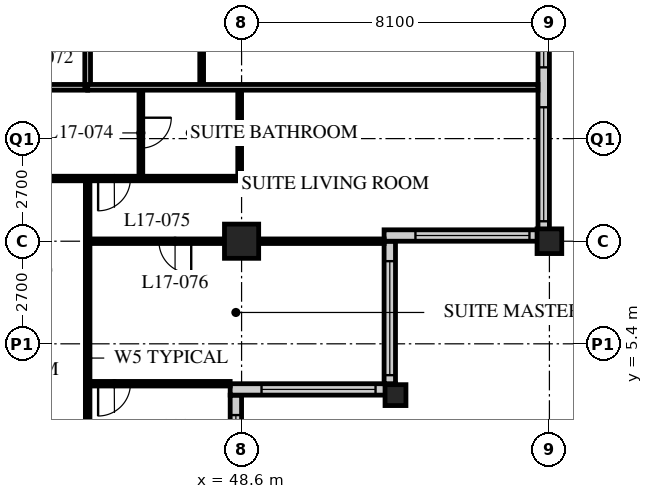
"""IFC4 building model, lengths in metres.
Left out: names, types, materials, properties, quantities, classifications, styles, units other than length and angle.
Written with IfcOpenShell. Run it as: python <this file> out.ifc"""

import sys

from ifc_helpers import new_model, si_unit, direction, frame, frame_2d, origin, origin_2d, place, context, subcontext, project, spatial, rectangle, hollow_rectangle, extrude, element, fill, save


model = new_model("IFC4")
c1 = context("Model", 3, precision=1e-05, world=origin(), true_north=direction((0.0, 1.0)))
c2 = subcontext(c1, "Body", "Model", "MODEL_VIEW")
j1 = project(units=[si_unit("LENGTHUNIT", "METRE"), si_unit("PLANEANGLEUNIT", "RADIAN")], contexts=[c1])
p1 = place(None, origin())
s1 = spatial("IfcSite", under=j1, at=p1, CompositionType="ELEMENT")
p2 = place(p1, origin())
s2 = spatial("IfcBuilding", under=s1, at=p2, CompositionType="ELEMENT")
p3 = place(p2, frame((0.0, 0.0, 70.4)))
s3 = spatial("IfcBuildingStorey", under=s2, at=p3, CompositionType="ELEMENT", Elevation=70.4)
p4 = place(p3, frame((48.6, 8.1, 0.0), z_axis=(0.0, 0.0, 1.0), x_axis=(1.0, 0.0, 0.0)))
e1 = element("IfcColumn", 1, at=p4, inside=s3, PredefinedType="COLUMN", context=c2, shape_type="SweptSolid", body=[
    extrude(hollow_rectangle(XDim=0.9, YDim=0.9, WallThickness=0.09, at=origin_2d()), origin(), (0.0, 0.0, 1.0), 3.4),
])
p5 = place(p3, frame((52.65, 4.05, 0.0), z_axis=(0.0, 0.0, 1.0), x_axis=(1.0, 0.0, 0.0)))
e2 = element("IfcColumn", 2, at=p5, inside=s3, PredefinedType="COLUMN", context=c2, shape_type="SweptSolid", body=[
    extrude(hollow_rectangle(XDim=0.55, YDim=0.55, WallThickness=0.05, at=origin_2d()), origin(), (0.0, 0.0, 1.0), 3.4),
])
p6 = place(p3, frame((56.7, 8.1, 0.0), z_axis=(0.0, 0.0, 1.0), x_axis=(1.0, 0.0, 0.0)))
e3 = element("IfcColumn", 3, at=p6, inside=s3, PredefinedType="COLUMN", context=c2, shape_type="SweptSolid", body=[
    extrude(hollow_rectangle(XDim=0.65, YDim=0.65, WallThickness=0.05, at=origin_2d()), origin(), (0.0, 0.0, 1.0), 3.4),
])
p7 = place(p3, frame((48.45, 0.3, 0.0), z_axis=(0.0, 0.0, 1.0), x_axis=(0.0, 1.0, 0.0)))
e4 = element("IfcWall", 4, at=p7, inside=s3, PredefinedType="SOLIDWALL", context=c2, shape_type="SweptSolid", body=[
    extrude(rectangle(XDim=3.75, YDim=0.3, at=frame_2d((1.875, 0.0))), origin(), (0.0, 0.0, 1.0), 3.19),
])
p8 = place(p7, frame((0.225, 0.0, 0.9)))
e5 = element("IfcOpeningElement", 5, at=p8, cuts=e4, PredefinedType="OPENING", context=c2, shape_type="SweptSolid", body=[
    extrude(rectangle(XDim=3.0, YDim=1.5, at=frame_2d((1.5, 0.75))), frame((0.0, 0.16, 0.0), z_axis=(0.0, -1.0, 0.0), x_axis=(1.0, 0.0, 0.0)), (0.0, 0.0, 1.0), 0.32),
])
p9 = place(p3, frame((48.3, 4.2, 0.0), z_axis=(0.0, 0.0, 1.0), x_axis=(1.0, 0.0, 0.0)))
e6 = element("IfcWall", 6, at=p9, inside=s3, PredefinedType="SOLIDWALL", context=c2, shape_type="SweptSolid", body=[
    extrude(rectangle(XDim=4.35, YDim=0.3, at=frame_2d((2.175, 0.0))), origin(), (0.0, 0.0, 1.0), 3.19),
])
p10 = place(p9, frame((0.825, 0.0, 0.9)))
e7 = element("IfcOpeningElement", 7, at=p10, cuts=e6, PredefinedType="OPENING", context=c2, shape_type="SweptSolid", body=[
    extrude(rectangle(XDim=3.0, YDim=1.5, at=frame_2d((1.5, 0.75))), frame((0.0, 0.16, 0.0), z_axis=(0.0, -1.0, 0.0), x_axis=(1.0, 0.0, 0.0)), (0.0, 0.0, 1.0), 0.32),
])
p11 = place(p3, frame((52.5, 4.35, 0.0), z_axis=(0.0, 0.0, 1.0), x_axis=(0.0, 1.0, 0.0)))
e8 = element("IfcWall", 8, at=p11, inside=s3, PredefinedType="SOLIDWALL", context=c2, shape_type="SweptSolid", body=[
    extrude(rectangle(XDim=3.75, YDim=0.3, at=frame_2d((1.875, 0.0))), origin(), (0.0, 0.0, 1.0), 3.19),
])
p12 = place(p11, frame((0.225, 0.0, 0.9)))
e9 = element("IfcOpeningElement", 9, at=p12, cuts=e8, PredefinedType="OPENING", context=c2, shape_type="SweptSolid", body=[
    extrude(rectangle(XDim=3.0, YDim=1.5, at=frame_2d((1.5, 0.75))), frame((0.0, 0.16, 0.0), z_axis=(0.0, -1.0, 0.0), x_axis=(1.0, 0.0, 0.0)), (0.0, 0.0, 1.0), 0.32),
])
p13 = place(p3, frame((52.35, 8.25, 0.0), z_axis=(0.0, 0.0, 1.0), x_axis=(1.0, 0.0, 0.0)))
e10 = element("IfcWall", 10, at=p13, inside=s3, PredefinedType="SOLIDWALL", context=c2, shape_type="SweptSolid", body=[
    extrude(rectangle(XDim=4.35, YDim=0.3, at=frame_2d((2.175, 0.0))), origin(), (0.0, 0.0, 1.0), 3.19),
])
p14 = place(p13, frame((0.825, 0.0, 0.9)))
e11 = element("IfcOpeningElement", 11, at=p14, cuts=e10, PredefinedType="OPENING", context=c2, shape_type="SweptSolid", body=[
    extrude(rectangle(XDim=3.0, YDim=1.5, at=frame_2d((1.5, 0.75))), frame((0.0, 0.16, 0.0), z_axis=(0.0, -1.0, 0.0), x_axis=(1.0, 0.0, 0.0)), (0.0, 0.0, 1.0), 0.32),
])
p15 = place(p3, frame((56.55, 8.4, 0.0), z_axis=(0.0, 0.0, 1.0), x_axis=(0.0, 1.0, 0.0)))
e12 = element("IfcWall", 12, at=p15, inside=s3, PredefinedType="SOLIDWALL", context=c2, shape_type="SweptSolid", body=[
    extrude(rectangle(XDim=32.1, YDim=0.3, at=frame_2d((16.05, 0.0))), origin(), (0.0, 0.0, 1.0), 3.19),
])
p16 = place(p15, frame((0.225, 0.0, 0.9)))
e13 = element("IfcOpeningElement", 13, at=p16, cuts=e12, PredefinedType="OPENING", context=c2, shape_type="SweptSolid", body=[
    extrude(rectangle(XDim=3.0, YDim=2.0, at=frame_2d((1.5, 1.0))), frame((0.0, 0.16, 0.0), z_axis=(0.0, -1.0, 0.0), x_axis=(1.0, 0.0, 0.0)), (0.0, 0.0, 1.0), 0.32),
])
p17 = place(p15, frame((4.275, 0.0, 0.9)))
e14 = element("IfcOpeningElement", 14, at=p17, cuts=e12, PredefinedType="OPENING", context=c2, shape_type="SweptSolid", body=[
    extrude(rectangle(XDim=3.0, YDim=2.0, at=frame_2d((1.5, 1.0))), frame((0.0, 0.16, 0.0), z_axis=(0.0, -1.0, 0.0), x_axis=(1.0, 0.0, 0.0)), (0.0, 0.0, 1.0), 0.32),
])
p18 = place(p15, frame((8.325, 0.0, 0.9)))
e15 = element("IfcOpeningElement", 15, at=p18, cuts=e12, PredefinedType="OPENING", context=c2, shape_type="SweptSolid", body=[
    extrude(rectangle(XDim=3.0, YDim=2.0, at=frame_2d((1.5, 1.0))), frame((0.0, 0.16, 0.0), z_axis=(0.0, -1.0, 0.0), x_axis=(1.0, 0.0, 0.0)), (0.0, 0.0, 1.0), 0.32),
])
p19 = place(p15, frame((12.375, 0.0, 0.9)))
e16 = element("IfcOpeningElement", 16, at=p19, cuts=e12, PredefinedType="OPENING", context=c2, shape_type="SweptSolid", body=[
    extrude(rectangle(XDim=3.0, YDim=2.0, at=frame_2d((1.5, 1.0))), frame((0.0, 0.16, 0.0), z_axis=(0.0, -1.0, 0.0), x_axis=(1.0, 0.0, 0.0)), (0.0, 0.0, 1.0), 0.32),
])
p20 = place(p15, frame((16.425, 0.0, 0.9)))
e17 = element("IfcOpeningElement", 17, at=p20, cuts=e12, PredefinedType="OPENING", context=c2, shape_type="SweptSolid", body=[
    extrude(rectangle(XDim=3.0, YDim=2.0, at=frame_2d((1.5, 1.0))), frame((0.0, 0.16, 0.0), z_axis=(0.0, -1.0, 0.0), x_axis=(1.0, 0.0, 0.0)), (0.0, 0.0, 1.0), 0.32),
])
p21 = place(p15, frame((20.475, 0.0, 0.9)))
e18 = element("IfcOpeningElement", 18, at=p21, cuts=e12, PredefinedType="OPENING", context=c2, shape_type="SweptSolid", body=[
    extrude(rectangle(XDim=3.0, YDim=2.0, at=frame_2d((1.5, 1.0))), frame((0.0, 0.16, 0.0), z_axis=(0.0, -1.0, 0.0), x_axis=(1.0, 0.0, 0.0)), (0.0, 0.0, 1.0), 0.32),
])
p22 = place(p15, frame((24.525, 0.0, 0.9)))
e19 = element("IfcOpeningElement", 19, at=p22, cuts=e12, PredefinedType="OPENING", context=c2, shape_type="SweptSolid", body=[
    extrude(rectangle(XDim=3.0, YDim=2.0, at=frame_2d((1.5, 1.0))), frame((0.0, 0.16, 0.0), z_axis=(0.0, -1.0, 0.0), x_axis=(1.0, 0.0, 0.0)), (0.0, 0.0, 1.0), 0.32),
])
p23 = place(p15, frame((28.575, 0.0, 0.9)))
e20 = element("IfcOpeningElement", 20, at=p23, cuts=e12, PredefinedType="OPENING", context=c2, shape_type="SweptSolid", body=[
    extrude(rectangle(XDim=3.0, YDim=2.0, at=frame_2d((1.5, 1.0))), frame((0.0, 0.16, 0.0), z_axis=(0.0, -1.0, 0.0), x_axis=(1.0, 0.0, 0.0)), (0.0, 0.0, 1.0), 0.32),
])
p24 = place(p3, frame((8.1, 12.15, 0.0), z_axis=(0.0, 0.0, 1.0), x_axis=(1.0, 0.0, 0.0)))
e21 = element("IfcWall", 21, at=p24, inside=s3, PredefinedType="PARTITIONING", context=c2, shape_type="SweptSolid", body=[
    extrude(rectangle(XDim=36.45, YDim=0.15, at=frame_2d((18.225, 0.0))), origin(), (0.0, 0.0, 1.0), 3.19),
])
p25 = place(p24, frame((4.35, 0.0, 0.0)))
e22 = element("IfcOpeningElement", 22, at=p25, cuts=e21, PredefinedType="OPENING", context=c2, shape_type="SweptSolid", body=[
    extrude(rectangle(XDim=1.0, YDim=2.1, at=frame_2d((0.5, 1.05))), frame((0.0, 0.085, 0.0), z_axis=(0.0, -1.0, 0.0), x_axis=(1.0, 0.0, 0.0)), (0.0, 0.0, 1.0), 0.17),
])
p26 = place(p24, frame((10.55, 0.0, 0.0)))
e23 = element("IfcOpeningElement", 23, at=p26, cuts=e21, PredefinedType="OPENING", context=c2, shape_type="SweptSolid", body=[
    extrude(rectangle(XDim=1.0, YDim=2.1, at=frame_2d((0.5, 1.05))), frame((0.0, 0.085, 0.0), z_axis=(0.0, -1.0, 0.0), x_axis=(1.0, 0.0, 0.0)), (0.0, 0.0, 1.0), 0.17),
])
p27 = place(p24, frame((14.6, 0.0, 0.0)))
e24 = element("IfcOpeningElement", 24, at=p27, cuts=e21, PredefinedType="OPENING", context=c2, shape_type="SweptSolid", body=[
    extrude(rectangle(XDim=1.0, YDim=2.1, at=frame_2d((0.5, 1.05))), frame((0.0, 0.085, 0.0), z_axis=(0.0, -1.0, 0.0), x_axis=(1.0, 0.0, 0.0)), (0.0, 0.0, 1.0), 0.17),
])
p28 = place(p24, frame((18.65, 0.0, 0.0)))
e25 = element("IfcOpeningElement", 25, at=p28, cuts=e21, PredefinedType="OPENING", context=c2, shape_type="SweptSolid", body=[
    extrude(rectangle(XDim=1.0, YDim=2.1, at=frame_2d((0.5, 1.05))), frame((0.0, 0.085, 0.0), z_axis=(0.0, -1.0, 0.0), x_axis=(1.0, 0.0, 0.0)), (0.0, 0.0, 1.0), 0.17),
])
p29 = place(p24, frame((22.7, 0.0, 0.0)))
e26 = element("IfcOpeningElement", 26, at=p29, cuts=e21, PredefinedType="OPENING", context=c2, shape_type="SweptSolid", body=[
    extrude(rectangle(XDim=1.0, YDim=2.1, at=frame_2d((0.5, 1.05))), frame((0.0, 0.085, 0.0), z_axis=(0.0, -1.0, 0.0), x_axis=(1.0, 0.0, 0.0)), (0.0, 0.0, 1.0), 0.17),
])
p30 = place(p24, frame((24.6, 0.0, 0.0)))
e27 = element("IfcOpeningElement", 27, at=p30, cuts=e21, PredefinedType="OPENING", context=c2, shape_type="SweptSolid", body=[
    extrude(rectangle(XDim=1.0, YDim=2.1, at=frame_2d((0.5, 1.05))), frame((0.0, 0.085, 0.0), z_axis=(0.0, -1.0, 0.0), x_axis=(1.0, 0.0, 0.0)), (0.0, 0.0, 1.0), 0.17),
])
p31 = place(p24, frame((30.8, 0.0, 0.0)))
e28 = element("IfcOpeningElement", 28, at=p31, cuts=e21, PredefinedType="OPENING", context=c2, shape_type="SweptSolid", body=[
    extrude(rectangle(XDim=1.0, YDim=2.1, at=frame_2d((0.5, 1.05))), frame((0.0, 0.085, 0.0), z_axis=(0.0, -1.0, 0.0), x_axis=(1.0, 0.0, 0.0)), (0.0, 0.0, 1.0), 0.17),
])
p32 = place(p24, frame((1.525, 0.0, 0.0)))
e29 = element("IfcOpeningElement", 29, at=p32, cuts=e21, PredefinedType="OPENING", context=c2, shape_type="SweptSolid", body=[
    extrude(rectangle(XDim=1.0, YDim=2.1, at=frame_2d((0.5, 1.05))), frame((0.0, 0.085, 0.0), z_axis=(0.0, -1.0, 0.0), x_axis=(1.0, 0.0, 0.0)), (0.0, 0.0, 1.0), 0.17),
])
p33 = place(p24, frame((33.925, 0.0, 0.0)))
e30 = element("IfcOpeningElement", 30, at=p33, cuts=e21, PredefinedType="OPENING", context=c2, shape_type="SweptSolid", body=[
    extrude(rectangle(XDim=1.0, YDim=2.1, at=frame_2d((0.5, 1.05))), frame((0.0, 0.085, 0.0), z_axis=(0.0, -1.0, 0.0), x_axis=(1.0, 0.0, 0.0)), (0.0, 0.0, 1.0), 0.17),
])
p34 = place(p3, frame((44.55, 12.15, 0.0), z_axis=(0.0, 0.0, 1.0), x_axis=(0.0, 1.0, 0.0)))
e31 = element("IfcWall", 31, at=p34, inside=s3, PredefinedType="PARTITIONING", context=c2, shape_type="SweptSolid", body=[
    extrude(rectangle(XDim=30.15, YDim=0.15, at=frame_2d((15.075, 0.0))), origin(), (0.0, 0.0, 1.0), 3.19),
])
p35 = place(p34, frame((2.45, 0.0, 0.0)))
e32 = element("IfcOpeningElement", 32, at=p35, cuts=e31, PredefinedType="OPENING", context=c2, shape_type="SweptSolid", body=[
    extrude(rectangle(XDim=1.0, YDim=2.1, at=frame_2d((0.5, 1.05))), frame((0.0, 0.085, 0.0), z_axis=(0.0, -1.0, 0.0), x_axis=(1.0, 0.0, 0.0)), (0.0, 0.0, 1.0), 0.17),
])
p36 = place(p34, frame((4.35, 0.0, 0.0)))
e33 = element("IfcOpeningElement", 33, at=p36, cuts=e31, PredefinedType="OPENING", context=c2, shape_type="SweptSolid", body=[
    extrude(rectangle(XDim=1.0, YDim=2.1, at=frame_2d((0.5, 1.05))), frame((0.0, 0.085, 0.0), z_axis=(0.0, -1.0, 0.0), x_axis=(1.0, 0.0, 0.0)), (0.0, 0.0, 1.0), 0.17),
])
p37 = place(p34, frame((8.4, 0.0, 0.0)))
e34 = element("IfcOpeningElement", 34, at=p37, cuts=e31, PredefinedType="OPENING", context=c2, shape_type="SweptSolid", body=[
    extrude(rectangle(XDim=1.0, YDim=2.1, at=frame_2d((0.5, 1.05))), frame((0.0, 0.085, 0.0), z_axis=(0.0, -1.0, 0.0), x_axis=(1.0, 0.0, 0.0)), (0.0, 0.0, 1.0), 0.17),
])
p38 = place(p34, frame((14.6, 0.0, 0.0)))
e35 = element("IfcOpeningElement", 35, at=p38, cuts=e31, PredefinedType="OPENING", context=c2, shape_type="SweptSolid", body=[
    extrude(rectangle(XDim=1.0, YDim=2.1, at=frame_2d((0.5, 1.05))), frame((0.0, 0.085, 0.0), z_axis=(0.0, -1.0, 0.0), x_axis=(1.0, 0.0, 0.0)), (0.0, 0.0, 1.0), 0.17),
])
p39 = place(p34, frame((21.65, 0.0, 0.0)))
e36 = element("IfcOpeningElement", 36, at=p39, cuts=e31, PredefinedType="OPENING", context=c2, shape_type="SweptSolid", body=[
    extrude(rectangle(XDim=1.0, YDim=2.1, at=frame_2d((0.5, 1.05))), frame((0.0, 0.085, 0.0), z_axis=(0.0, -1.0, 0.0), x_axis=(1.0, 0.0, 0.0)), (0.0, 0.0, 1.0), 0.17),
])
p40 = place(p34, frame((26.7, 0.0, 0.0)))
e37 = element("IfcOpeningElement", 37, at=p40, cuts=e31, PredefinedType="OPENING", context=c2, shape_type="SweptSolid", body=[
    extrude(rectangle(XDim=1.0, YDim=2.1, at=frame_2d((0.5, 1.05))), frame((0.0, 0.085, 0.0), z_axis=(0.0, -1.0, 0.0), x_axis=(1.0, 0.0, 0.0)), (0.0, 0.0, 1.0), 0.17),
])
p41 = place(p3, frame((47.55, 12.15, 0.0), z_axis=(0.0, 0.0, 1.0), x_axis=(0.0, 1.0, 0.0)))
e38 = element("IfcWall", 38, at=p41, inside=s3, PredefinedType="PARTITIONING", context=c2, shape_type="SweptSolid", body=[
    extrude(rectangle(XDim=2.3, YDim=0.1, at=frame_2d((1.15, 0.0))), origin(), (0.0, 0.0, 1.0), 3.19),
])
p42 = place(p3, frame((40.5, 9.75, 0.0), z_axis=(0.0, 0.0, 1.0), x_axis=(1.0, 0.0, 0.0)))
e39 = element("IfcWall", 39, at=p42, inside=s3, PredefinedType="PARTITIONING", context=c2, shape_type="SweptSolid", body=[
    extrude(rectangle(XDim=8.05, YDim=0.12, at=frame_2d((4.025, 0.0))), origin(), (0.0, 0.0, 1.0), 3.19),
])
p43 = place(p42, frame((0.475, 0.0, 0.0)))
e40 = element("IfcOpeningElement", 40, at=p43, cuts=e39, PredefinedType="OPENING", context=c2, shape_type="SweptSolid", body=[
    extrude(rectangle(XDim=0.85, YDim=2.1, at=frame_2d((0.425, 1.05))), frame((0.0, 0.07, 0.0), z_axis=(0.0, -1.0, 0.0), x_axis=(1.0, 0.0, 0.0)), (0.0, 0.0, 1.0), 0.14),
])
p44 = place(p42, frame((4.325, 0.0, 0.0)))
e41 = element("IfcOpeningElement", 41, at=p44, cuts=e39, PredefinedType="OPENING", context=c2, shape_type="SweptSolid", body=[
    extrude(rectangle(XDim=0.85, YDim=2.1, at=frame_2d((0.425, 1.05))), frame((0.0, 0.07, 0.0), z_axis=(0.0, -1.0, 0.0), x_axis=(1.0, 0.0, 0.0)), (0.0, 0.0, 1.0), 0.14),
])
p45 = place(p3, frame((45.95, 12.15, 0.0), z_axis=(0.0, 0.0, 1.0), x_axis=(0.0, -1.0, 0.0)))
e42 = element("IfcWall", 42, at=p45, inside=s3, PredefinedType="PARTITIONING", context=c2, shape_type="SweptSolid", body=[
    extrude(rectangle(XDim=2.4, YDim=0.1, at=frame_2d((1.2, 0.0))), origin(), (0.0, 0.0, 1.0), 3.19),
])
p46 = place(p45, frame((0.8, 0.0, 0.0)))
e43 = element("IfcOpeningElement", 43, at=p46, cuts=e42, PredefinedType="OPENING", context=c2, shape_type="SweptSolid", body=[
    extrude(rectangle(XDim=0.8, YDim=2.1, at=frame_2d((0.4, 1.05))), frame((0.0, 0.06, 0.0), z_axis=(0.0, -1.0, 0.0), x_axis=(1.0, 0.0, 0.0)), (0.0, 0.0, 1.0), 0.12),
])
p47 = place(p3, frame((48.55, 12.15, 0.0), z_axis=(0.0, 0.0, 1.0), x_axis=(0.0, -1.0, 0.0)))
e44 = element("IfcWall", 44, at=p47, inside=s3, PredefinedType="PARTITIONING", context=c2, shape_type="SweptSolid", body=[
    extrude(rectangle(XDim=2.4, YDim=0.1, at=frame_2d((1.2, 0.0))), origin(), (0.0, 0.0, 1.0), 2.578),
])
p48 = place(p3, frame((44.55, 9.75, 0.0), z_axis=(0.0, 0.0, 1.0), x_axis=(0.0, -1.0, 0.0)))
e45 = element("IfcWall", 45, at=p48, inside=s3, PredefinedType="PARTITIONING", context=c2, shape_type="SweptSolid", body=[
    extrude(rectangle(XDim=9.45, YDim=0.12, at=frame_2d((4.725, 0.0))), origin(), (0.0, 0.0, 1.0), 3.19),
])
p49 = place(p3, frame((44.55, 8.1, 0.0), z_axis=(0.0, 0.0, 1.0), x_axis=(1.0, 0.0, 0.0)))
e46 = element("IfcWall", 46, at=p49, inside=s3, PredefinedType="PARTITIONING", context=c2, shape_type="SweptSolid", body=[
    extrude(rectangle(XDim=7.8, YDim=0.12, at=frame_2d((3.9, 0.0))), origin(), (0.0, 0.0, 1.0), 2.578),
])
p50 = place(p49, frame((1.875, 0.0, 0.0)))
e47 = element("IfcOpeningElement", 47, at=p50, cuts=e46, PredefinedType="OPENING", context=c2, shape_type="SweptSolid", body=[
    extrude(rectangle(XDim=0.85, YDim=2.1, at=frame_2d((0.425, 1.05))), frame((0.0, 0.07, 0.0), z_axis=(0.0, -1.0, 0.0), x_axis=(1.0, 0.0, 0.0)), (0.0, 0.0, 1.0), 0.14),
])
p51 = place(p3, frame((44.55, 12.15, 0.0), z_axis=(0.0, 0.0, 1.0), x_axis=(1.0, 0.0, 0.0)))
e48 = element("IfcWall", 48, at=p51, inside=s3, PredefinedType="PARTITIONING", context=c2, shape_type="SweptSolid", body=[
    extrude(rectangle(XDim=11.85, YDim=0.15, at=frame_2d((5.925, 0.0))), origin(), (0.0, 0.0, 1.0), 3.19),
])
p52 = place(p3, frame((44.55, 4.35, 0.0), z_axis=(0.0, 0.0, 1.0), x_axis=(1.0, 0.0, 0.0)))
e49 = element("IfcWall", 49, at=p52, inside=s3, PredefinedType="PARTITIONING", context=c2, shape_type="SweptSolid", body=[
    extrude(rectangle(XDim=3.75, YDim=0.12, at=frame_2d((1.875, 0.0))), origin(), (0.0, 0.0, 1.0), 3.19),
])
p53 = place(p52, frame((0.275, 0.0, 0.0)))
e50 = element("IfcOpeningElement", 50, at=p53, cuts=e49, PredefinedType="OPENING", context=c2, shape_type="SweptSolid", body=[
    extrude(rectangle(XDim=0.85, YDim=2.1, at=frame_2d((0.425, 1.05))), frame((0.0, 0.07, 0.0), z_axis=(0.0, -1.0, 0.0), x_axis=(1.0, 0.0, 0.0)), (0.0, 0.0, 1.0), 0.14),
])
p54 = place(p8, origin())
e51 = element("IfcWindow", 51, at=p54, inside=s3, PartitioningType="SINGLE_PANEL", PredefinedType="WINDOW", context=c2, shape_type="SweptSolid", body=[
    extrude(rectangle(XDim=3.0, YDim=1.5, at=frame_2d((1.5, 0.75))), frame((0.0, 0.03, 0.0), z_axis=(0.0, -1.0, 0.0), x_axis=(1.0, 0.0, 0.0)), (0.0, 0.0, 1.0), 0.06),
])
fill(e5, e51)
p55 = place(p10, origin())
e52 = element("IfcWindow", 52, at=p55, inside=s3, PartitioningType="SINGLE_PANEL", PredefinedType="WINDOW", context=c2, shape_type="SweptSolid", body=[
    extrude(rectangle(XDim=3.0, YDim=1.5, at=frame_2d((1.5, 0.75))), frame((0.0, 0.03, 0.0), z_axis=(0.0, -1.0, 0.0), x_axis=(1.0, 0.0, 0.0)), (0.0, 0.0, 1.0), 0.06),
])
fill(e7, e52)
p56 = place(p12, origin())
e53 = element("IfcWindow", 53, at=p56, inside=s3, PartitioningType="SINGLE_PANEL", PredefinedType="WINDOW", context=c2, shape_type="SweptSolid", body=[
    extrude(rectangle(XDim=3.0, YDim=1.5, at=frame_2d((1.5, 0.75))), frame((0.0, 0.03, 0.0), z_axis=(0.0, -1.0, 0.0), x_axis=(1.0, 0.0, 0.0)), (0.0, 0.0, 1.0), 0.06),
])
fill(e9, e53)
p57 = place(p14, origin())
e54 = element("IfcWindow", 54, at=p57, inside=s3, PartitioningType="SINGLE_PANEL", PredefinedType="WINDOW", context=c2, shape_type="SweptSolid", body=[
    extrude(rectangle(XDim=3.0, YDim=1.5, at=frame_2d((1.5, 0.75))), frame((0.0, 0.03, 0.0), z_axis=(0.0, -1.0, 0.0), x_axis=(1.0, 0.0, 0.0)), (0.0, 0.0, 1.0), 0.06),
])
fill(e11, e54)
p58 = place(p16, origin())
e55 = element("IfcWindow", 55, at=p58, inside=s3, PartitioningType="SINGLE_PANEL", PredefinedType="WINDOW", context=c2, shape_type="SweptSolid", body=[
    extrude(rectangle(XDim=3.0, YDim=2.0, at=frame_2d((1.5, 1.0))), frame((0.0, 0.03, 0.0), z_axis=(0.0, -1.0, 0.0), x_axis=(1.0, 0.0, 0.0)), (0.0, 0.0, 1.0), 0.06),
])
fill(e13, e55)
p59 = place(p17, origin())
e56 = element("IfcWindow", 56, at=p59, inside=s3, PartitioningType="SINGLE_PANEL", PredefinedType="WINDOW", context=c2, shape_type="SweptSolid", body=[
    extrude(rectangle(XDim=3.0, YDim=2.0, at=frame_2d((1.5, 1.0))), frame((0.0, 0.03, 0.0), z_axis=(0.0, -1.0, 0.0), x_axis=(1.0, 0.0, 0.0)), (0.0, 0.0, 1.0), 0.06),
])
fill(e14, e56)
p60 = place(p46, origin())
e57 = element("IfcDoor", 57, at=p60, inside=s3, OperationType="SINGLE_SWING_LEFT", PredefinedType="DOOR", context=c2, shape_type="SweptSolid", body=[
    extrude(rectangle(XDim=0.8, YDim=2.1, at=frame_2d((0.4, 1.05))), frame((0.0, 0.025, 0.0), z_axis=(0.0, -1.0, 0.0), x_axis=(1.0, 0.0, 0.0)), (0.0, 0.0, 1.0), 0.05),
])
fill(e43, e57)
p61 = place(p44, origin())
e58 = element("IfcDoor", 58, at=p61, inside=s3, OperationType="SINGLE_SWING_RIGHT", PredefinedType="DOOR", context=c2, shape_type="SweptSolid", body=[
    extrude(rectangle(XDim=0.85, YDim=2.1, at=frame_2d((0.425, 1.05))), frame((0.0, 0.025, 0.0), z_axis=(0.0, -1.0, 0.0), x_axis=(1.0, 0.0, 0.0)), (0.0, 0.0, 1.0), 0.05),
])
fill(e41, e58)
p62 = place(p50, origin())
e59 = element("IfcDoor", 59, at=p62, inside=s3, OperationType="SINGLE_SWING_LEFT", PredefinedType="DOOR", context=c2, shape_type="SweptSolid", body=[
    extrude(rectangle(XDim=0.85, YDim=2.1, at=frame_2d((0.425, 1.05))), frame((0.0, 0.025, 0.0), z_axis=(0.0, -1.0, 0.0), x_axis=(1.0, 0.0, 0.0)), (0.0, 0.0, 1.0), 0.05),
])
fill(e47, e59)
p63 = place(p53, origin())
e60 = element("IfcDoor", 60, at=p63, inside=s3, OperationType="SINGLE_SWING_RIGHT", PredefinedType="DOOR", context=c2, shape_type="SweptSolid", body=[
    extrude(rectangle(XDim=0.85, YDim=2.1, at=frame_2d((0.425, 1.05))), frame((0.0, 0.025, 0.0), z_axis=(0.0, -1.0, 0.0), x_axis=(1.0, 0.0, 0.0)), (0.0, 0.0, 1.0), 0.05),
])
fill(e50, e60)
save(model, sys.argv[1])
